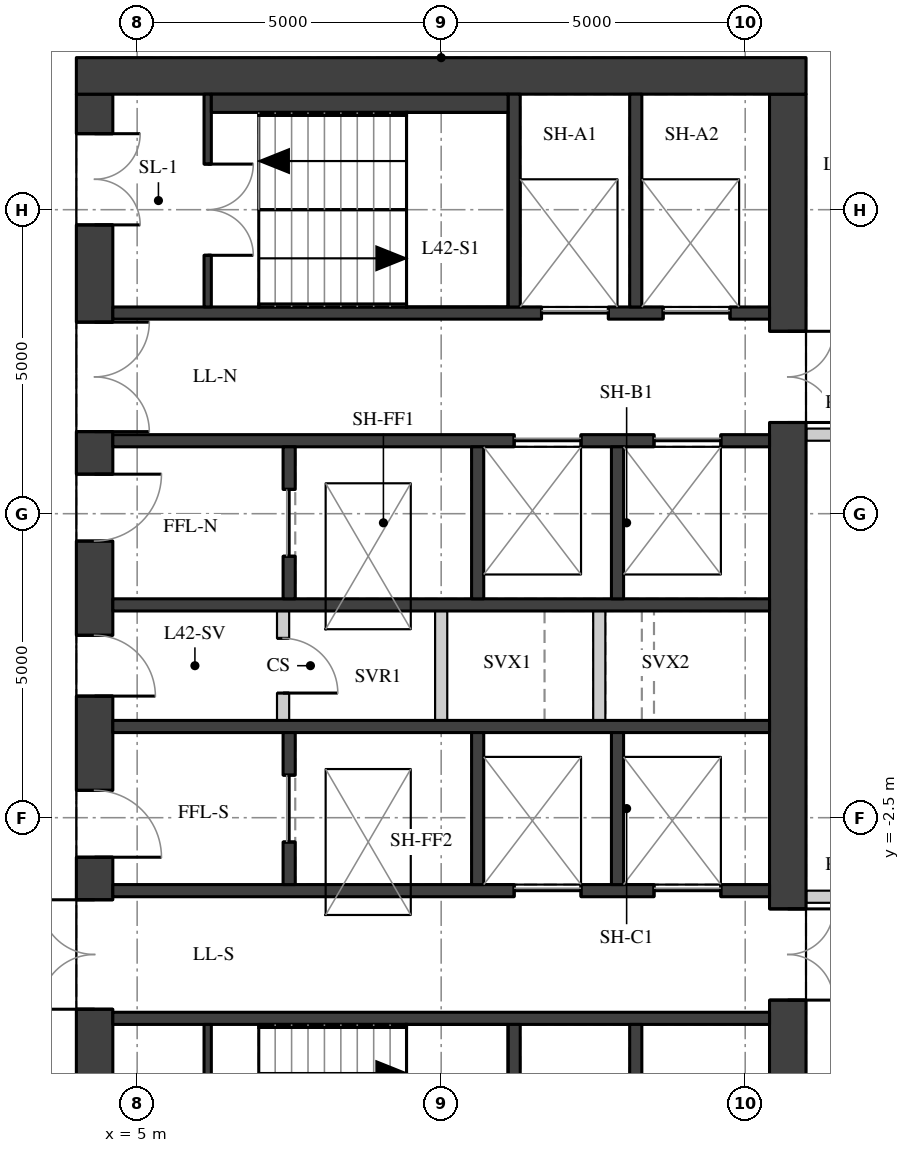
"""IFC4 building model, lengths in metres.
Left out: names, types, materials, properties, quantities, classifications, styles, units other than length and angle.
Written with IfcOpenShell. Run it as: python <this file> out.ifc"""

import sys

from ifc_helpers import new_model, si_unit, direction, frame, frame_2d, origin, place, context, subcontext, project, spatial, rectangle, extrude, element, fill, save


model = new_model("IFC4")
c1 = context("Model", 3, precision=1e-05, world=origin(), true_north=direction((0.0, 1.0)))
c2 = subcontext(c1, "Body", "Model", "MODEL_VIEW")
j1 = project(units=[si_unit("LENGTHUNIT", "METRE"), si_unit("PLANEANGLEUNIT", "RADIAN")], contexts=[c1])
p1 = place(None, origin())
s1 = spatial("IfcSite", under=j1, at=p1, CompositionType="ELEMENT")
p2 = place(p1, origin())
s2 = spatial("IfcBuilding", under=s1, at=p2, CompositionType="ELEMENT")
p3 = place(p2, frame((0.0, 0.0, 151.7)))
s3 = spatial("IfcBuildingStorey", under=s2, at=p3, CompositionType="ELEMENT", Elevation=151.7)
p4 = place(p3, frame((4.3, -9.4, 0.0), z_axis=(0.0, 0.0, 1.0), x_axis=(0.0, 1.0, 0.0)))
e1 = element("IfcWall", 1, at=p4, inside=s3, PredefinedType="SHEAR", context=c2, shape_type="SweptSolid", body=[
    extrude(rectangle(XDim=18.8, YDim=0.6, at=frame_2d((9.4, 0.0))), origin(), (0.0, 0.0, 1.0), 3.02),
])
p5 = place(p4, frame((0.65, 0.0, 0.0)))
e2 = element("IfcOpeningElement", 2, at=p5, cuts=e1, PredefinedType="OPENING", context=c2, shape_type="SweptSolid", body=[
    extrude(rectangle(XDim=1.5, YDim=2.1, at=frame_2d((0.75, 1.05))), frame((0.0, 0.31, 0.0), z_axis=(0.0, -1.0, 0.0), x_axis=(1.0, 0.0, 0.0)), (0.0, 0.0, 1.0), 0.62),
])
p6 = place(p4, frame((3.75, 0.0, 0.0)))
e3 = element("IfcOpeningElement", 3, at=p6, cuts=e1, PredefinedType="OPENING", context=c2, shape_type="SweptSolid", body=[
    extrude(rectangle(XDim=1.8, YDim=2.1, at=frame_2d((0.9, 1.05))), frame((0.0, 0.31, 0.0), z_axis=(0.0, -1.0, 0.0), x_axis=(1.0, 0.0, 0.0)), (0.0, 0.0, 1.0), 0.62),
])
p7 = place(p4, frame((6.25, 0.0, 0.0)))
e4 = element("IfcOpeningElement", 4, at=p7, cuts=e1, PredefinedType="OPENING", context=c2, shape_type="SweptSolid", body=[
    extrude(rectangle(XDim=1.1, YDim=2.1, at=frame_2d((0.55, 1.05))), frame((0.0, 0.31, 0.0), z_axis=(0.0, -1.0, 0.0), x_axis=(1.0, 0.0, 0.0)), (0.0, 0.0, 1.0), 0.62),
])
p8 = place(p4, frame((8.9, 0.0, 0.0)))
e5 = element("IfcOpeningElement", 5, at=p8, cuts=e1, PredefinedType="OPENING", context=c2, shape_type="SweptSolid", body=[
    extrude(rectangle(XDim=1.0, YDim=2.1, at=frame_2d((0.5, 1.05))), frame((0.0, 0.31, 0.0), z_axis=(0.0, -1.0, 0.0), x_axis=(1.0, 0.0, 0.0)), (0.0, 0.0, 1.0), 0.62),
])
p9 = place(p4, frame((11.45, 0.0, 0.0)))
e6 = element("IfcOpeningElement", 6, at=p9, cuts=e1, PredefinedType="OPENING", context=c2, shape_type="SweptSolid", body=[
    extrude(rectangle(XDim=1.1, YDim=2.1, at=frame_2d((0.55, 1.05))), frame((0.0, 0.31, 0.0), z_axis=(0.0, -1.0, 0.0), x_axis=(1.0, 0.0, 0.0)), (0.0, 0.0, 1.0), 0.62),
])
p10 = place(p4, frame((13.25, 0.0, 0.0)))
e7 = element("IfcOpeningElement", 7, at=p10, cuts=e1, PredefinedType="OPENING", context=c2, shape_type="SweptSolid", body=[
    extrude(rectangle(XDim=1.8, YDim=2.1, at=frame_2d((0.9, 1.05))), frame((0.0, 0.31, 0.0), z_axis=(0.0, -1.0, 0.0), x_axis=(1.0, 0.0, 0.0)), (0.0, 0.0, 1.0), 0.62),
])
p11 = place(p4, frame((16.65, 0.0, 0.0)))
e8 = element("IfcOpeningElement", 8, at=p11, cuts=e1, PredefinedType="OPENING", context=c2, shape_type="SweptSolid", body=[
    extrude(rectangle(XDim=1.5, YDim=2.1, at=frame_2d((0.75, 1.05))), frame((0.0, 0.31, 0.0), z_axis=(0.0, -1.0, 0.0), x_axis=(1.0, 0.0, 0.0)), (0.0, 0.0, 1.0), 0.62),
])
p12 = place(p3, frame((15.7, -9.4, 0.0), z_axis=(0.0, 0.0, 1.0), x_axis=(0.0, 1.0, 0.0)))
e9 = element("IfcWall", 9, at=p12, inside=s3, PredefinedType="SHEAR", context=c2, shape_type="SweptSolid", body=[
    extrude(rectangle(XDim=18.8, YDim=0.6, at=frame_2d((9.4, 0.0))), origin(), (0.0, 0.0, 1.0), 3.02),
])
p13 = place(p12, frame((13.4, 0.0, 0.0)))
e10 = element("IfcOpeningElement", 10, at=p13, cuts=e9, PredefinedType="OPENING", context=c2, shape_type="SweptSolid", body=[
    extrude(rectangle(XDim=1.5, YDim=2.1, at=frame_2d((0.75, 1.05))), frame((0.0, 0.31, 0.0), z_axis=(0.0, -1.0, 0.0), x_axis=(1.0, 0.0, 0.0)), (0.0, 0.0, 1.0), 0.62),
])
p14 = place(p12, frame((3.9, 0.0, 0.0)))
e11 = element("IfcOpeningElement", 11, at=p14, cuts=e9, PredefinedType="OPENING", context=c2, shape_type="SweptSolid", body=[
    extrude(rectangle(XDim=1.5, YDim=2.1, at=frame_2d((0.75, 1.05))), frame((0.0, 0.31, 0.0), z_axis=(0.0, -1.0, 0.0), x_axis=(1.0, 0.0, 0.0)), (0.0, 0.0, 1.0), 0.62),
])
p15 = place(p3, frame((4.0, 9.7, 0.0), z_axis=(0.0, 0.0, 1.0), x_axis=(1.0, 0.0, 0.0)))
e12 = element("IfcWall", 12, at=p15, inside=s3, PredefinedType="SHEAR", context=c2, shape_type="SweptSolid", body=[
    extrude(rectangle(XDim=12.0, YDim=0.6, at=frame_2d((6.0, 0.0))), origin(), (0.0, 0.0, 1.0), 3.02),
])
p16 = place(p3, frame((4.6, 5.8, 0.0), z_axis=(0.0, 0.0, 1.0), x_axis=(1.0, 0.0, 0.0)))
e13 = element("IfcWall", 13, at=p16, inside=s3, PredefinedType="SHEAR", context=c2, shape_type="SweptSolid", body=[
    extrude(rectangle(XDim=10.8, YDim=0.2, at=frame_2d((5.4, 0.0))), origin(), (0.0, 0.0, 1.0), 3.02),
])
p17 = place(p16, frame((7.05, 0.0, 0.0)))
e14 = element("IfcOpeningElement", 14, at=p17, cuts=e13, PredefinedType="OPENING", context=c2, shape_type="SweptSolid", body=[
    extrude(rectangle(XDim=1.1, YDim=2.1, at=frame_2d((0.55, 1.05))), frame((0.0, 0.11, 0.0), z_axis=(0.0, -1.0, 0.0), x_axis=(1.0, 0.0, 0.0)), (0.0, 0.0, 1.0), 0.22),
])
p18 = place(p16, frame((9.05, 0.0, 0.0)))
e15 = element("IfcOpeningElement", 15, at=p18, cuts=e13, PredefinedType="OPENING", context=c2, shape_type="SweptSolid", body=[
    extrude(rectangle(XDim=1.1, YDim=2.1, at=frame_2d((0.55, 1.05))), frame((0.0, 0.11, 0.0), z_axis=(0.0, -1.0, 0.0), x_axis=(1.0, 0.0, 0.0)), (0.0, 0.0, 1.0), 0.22),
])
p19 = place(p3, frame((4.6, 3.7, 0.0), z_axis=(0.0, 0.0, 1.0), x_axis=(1.0, 0.0, 0.0)))
e16 = element("IfcWall", 16, at=p19, inside=s3, PredefinedType="SHEAR", context=c2, shape_type="SweptSolid", body=[
    extrude(rectangle(XDim=10.8, YDim=0.2, at=frame_2d((5.4, 0.0))), origin(), (0.0, 0.0, 1.0), 3.02),
])
p20 = place(p19, frame((6.6, 0.0, 0.0)))
e17 = element("IfcOpeningElement", 17, at=p20, cuts=e16, PredefinedType="OPENING", context=c2, shape_type="SweptSolid", body=[
    extrude(rectangle(XDim=1.1, YDim=2.1, at=frame_2d((0.55, 1.05))), frame((0.0, 0.11, 0.0), z_axis=(0.0, -1.0, 0.0), x_axis=(1.0, 0.0, 0.0)), (0.0, 0.0, 1.0), 0.22),
])
p21 = place(p19, frame((8.9, 0.0, 0.0)))
e18 = element("IfcOpeningElement", 18, at=p21, cuts=e16, PredefinedType="OPENING", context=c2, shape_type="SweptSolid", body=[
    extrude(rectangle(XDim=1.1, YDim=2.1, at=frame_2d((0.55, 1.05))), frame((0.0, 0.11, 0.0), z_axis=(0.0, -1.0, 0.0), x_axis=(1.0, 0.0, 0.0)), (0.0, 0.0, 1.0), 0.22),
])
for number, where, z_axis, x_axis in (
    (19, (4.6, 1.0, 0.0), (0.0, 0.0, 1.0), (1.0, 0.0, 0.0)),
    (20, (4.6, -1.0, 0.0), (0.0, 0.0, 1.0), (1.0, 0.0, 0.0)),
):
    element("IfcWall", number, at=place(p3, frame(where, z_axis=z_axis, x_axis=x_axis)), inside=s3, PredefinedType="SHEAR", context=c2, shape_type="SweptSolid", body=[
        extrude(rectangle(XDim=10.8, YDim=0.2, at=frame_2d((5.4, 0.0))), origin(), (0.0, 0.0, 1.0), 3.02),
    ])
p22 = place(p3, frame((4.6, -3.7, 0.0), z_axis=(0.0, 0.0, 1.0), x_axis=(1.0, 0.0, 0.0)))
e21 = element("IfcWall", 21, at=p22, inside=s3, PredefinedType="SHEAR", context=c2, shape_type="SweptSolid", body=[
    extrude(rectangle(XDim=10.8, YDim=0.2, at=frame_2d((5.4, 0.0))), origin(), (0.0, 0.0, 1.0), 3.02),
])
p23 = place(p22, frame((6.6, 0.0, 0.0)))
e22 = element("IfcOpeningElement", 22, at=p23, cuts=e21, PredefinedType="OPENING", context=c2, shape_type="SweptSolid", body=[
    extrude(rectangle(XDim=1.1, YDim=2.1, at=frame_2d((0.55, 1.05))), frame((0.0, 0.11, 0.0), z_axis=(0.0, -1.0, 0.0), x_axis=(1.0, 0.0, 0.0)), (0.0, 0.0, 1.0), 0.22),
])
p24 = place(p22, frame((8.9, 0.0, 0.0)))
e23 = element("IfcOpeningElement", 23, at=p24, cuts=e21, PredefinedType="OPENING", context=c2, shape_type="SweptSolid", body=[
    extrude(rectangle(XDim=1.1, YDim=2.1, at=frame_2d((0.55, 1.05))), frame((0.0, 0.11, 0.0), z_axis=(0.0, -1.0, 0.0), x_axis=(1.0, 0.0, 0.0)), (0.0, 0.0, 1.0), 0.22),
])
p25 = place(p3, frame((4.6, -5.8, 0.0), z_axis=(0.0, 0.0, 1.0), x_axis=(1.0, 0.0, 0.0)))
e24 = element("IfcWall", 24, at=p25, inside=s3, PredefinedType="SHEAR", context=c2, shape_type="SweptSolid", body=[
    extrude(rectangle(XDim=10.8, YDim=0.2, at=frame_2d((5.4, 0.0))), origin(), (0.0, 0.0, 1.0), 3.02),
])
for number, where, z_axis, x_axis in (
    (25, (11.2, 5.9, 0.0), (0.0, 0.0, 1.0), (0.0, 1.0, 0.0)),
    (26, (11.2, -9.4, 0.0), (0.0, 0.0, 1.0), (0.0, 1.0, 0.0)),
    (27, (13.2, 5.9, 0.0), (0.0, 0.0, 1.0), (0.0, 1.0, 0.0)),
    (28, (13.2, -9.4, 0.0), (0.0, 0.0, 1.0), (0.0, 1.0, 0.0)),
):
    element("IfcWall", number, at=place(p3, frame(where, z_axis=z_axis, x_axis=x_axis)), inside=s3, PredefinedType="SHEAR", context=c2, shape_type="SweptSolid", body=[
        extrude(rectangle(XDim=3.5, YDim=0.2, at=frame_2d((1.75, 0.0))), origin(), (0.0, 0.0, 1.0), 3.02),
    ])
p26 = place(p3, frame((7.5, 1.1, 0.0), z_axis=(0.0, 0.0, 1.0), x_axis=(0.0, 1.0, 0.0)))
e29 = element("IfcWall", 29, at=p26, inside=s3, PredefinedType="SHEAR", context=c2, shape_type="SweptSolid", body=[
    extrude(rectangle(XDim=2.5, YDim=0.2, at=frame_2d((1.25, 0.0))), origin(), (0.0, 0.0, 1.0), 3.02),
])
p27 = place(p26, frame((0.7, 0.0, 0.0)))
e30 = element("IfcOpeningElement", 30, at=p27, cuts=e29, PredefinedType="OPENING", context=c2, shape_type="SweptSolid", body=[
    extrude(rectangle(XDim=1.1, YDim=2.1, at=frame_2d((0.55, 1.05))), frame((0.0, 0.11, 0.0), z_axis=(0.0, -1.0, 0.0), x_axis=(1.0, 0.0, 0.0)), (0.0, 0.0, 1.0), 0.22),
])
p28 = place(p3, frame((7.5, -3.6, 0.0), z_axis=(0.0, 0.0, 1.0), x_axis=(0.0, 1.0, 0.0)))
e31 = element("IfcWall", 31, at=p28, inside=s3, PredefinedType="SHEAR", context=c2, shape_type="SweptSolid", body=[
    extrude(rectangle(XDim=2.5, YDim=0.2, at=frame_2d((1.25, 0.0))), origin(), (0.0, 0.0, 1.0), 3.02),
])
p29 = place(p28, frame((0.7, 0.0, 0.0)))
e32 = element("IfcOpeningElement", 32, at=p29, cuts=e31, PredefinedType="OPENING", context=c2, shape_type="SweptSolid", body=[
    extrude(rectangle(XDim=1.1, YDim=2.1, at=frame_2d((0.55, 1.05))), frame((0.0, 0.11, 0.0), z_axis=(0.0, -1.0, 0.0), x_axis=(1.0, 0.0, 0.0)), (0.0, 0.0, 1.0), 0.22),
])
for number, where, z_axis, x_axis in (
    (33, (10.6, 1.1, 0.0), (0.0, 0.0, 1.0), (0.0, 1.0, 0.0)),
    (34, (10.6, -3.6, 0.0), (0.0, 0.0, 1.0), (0.0, 1.0, 0.0)),
    (35, (12.9, 1.1, 0.0), (0.0, 0.0, 1.0), (0.0, 1.0, 0.0)),
    (36, (12.9, -3.6, 0.0), (0.0, 0.0, 1.0), (0.0, 1.0, 0.0)),
):
    element("IfcWall", number, at=place(p3, frame(where, z_axis=z_axis, x_axis=x_axis)), inside=s3, PredefinedType="SHEAR", context=c2, shape_type="SweptSolid", body=[
        extrude(rectangle(XDim=2.5, YDim=0.2, at=frame_2d((1.25, 0.0))), origin(), (0.0, 0.0, 1.0), 3.02),
    ])
p30 = place(p3, frame((6.16, 5.9, 0.0), z_axis=(0.0, 0.0, 1.0), x_axis=(0.0, 1.0, 0.0)))
e37 = element("IfcWall", 37, at=p30, inside=s3, PredefinedType="SHEAR", context=c2, shape_type="SweptSolid", body=[
    extrude(rectangle(XDim=3.5, YDim=0.12, at=frame_2d((1.75, 0.0))), origin(), (0.0, 0.0, 1.0), 3.02),
])
p31 = place(p30, frame((0.85, 0.0, 0.0)))
e38 = element("IfcOpeningElement", 38, at=p31, cuts=e37, PredefinedType="OPENING", context=c2, shape_type="SweptSolid", body=[
    extrude(rectangle(XDim=1.5, YDim=2.1, at=frame_2d((0.75, 1.05))), frame((0.0, 0.07, 0.0), z_axis=(0.0, -1.0, 0.0), x_axis=(1.0, 0.0, 0.0)), (0.0, 0.0, 1.0), 0.14),
])
p32 = place(p3, frame((6.16, -9.4, 0.0), z_axis=(0.0, 0.0, 1.0), x_axis=(0.0, 1.0, 0.0)))
e39 = element("IfcWall", 39, at=p32, inside=s3, PredefinedType="SHEAR", context=c2, shape_type="SweptSolid", body=[
    extrude(rectangle(XDim=3.5, YDim=0.12, at=frame_2d((1.75, 0.0))), origin(), (0.0, 0.0, 1.0), 3.02),
])
p33 = place(p32, frame((1.15, 0.0, 0.0)))
e40 = element("IfcOpeningElement", 40, at=p33, cuts=e39, PredefinedType="OPENING", context=c2, shape_type="SweptSolid", body=[
    extrude(rectangle(XDim=1.5, YDim=2.1, at=frame_2d((0.75, 1.05))), frame((0.0, 0.07, 0.0), z_axis=(0.0, -1.0, 0.0), x_axis=(1.0, 0.0, 0.0)), (0.0, 0.0, 1.0), 0.14),
])
p34 = place(p3, frame((7.4, -0.9, 0.0), z_axis=(0.0, 0.0, 1.0), x_axis=(0.0, 1.0, 0.0)))
e41 = element("IfcWall", 41, at=p34, inside=s3, PredefinedType="PARTITIONING", context=c2, shape_type="SweptSolid", body=[
    extrude(rectangle(XDim=1.8, YDim=0.2, at=frame_2d((0.9, 0.0))), origin(), (0.0, 0.0, 1.0), 3.02),
])
p35 = place(p34, frame((0.45, 0.0, 0.0)))
e42 = element("IfcOpeningElement", 42, at=p35, cuts=e41, PredefinedType="OPENING", context=c2, shape_type="SweptSolid", body=[
    extrude(rectangle(XDim=0.9, YDim=2.1, at=frame_2d((0.45, 1.05))), frame((0.0, 0.11, 0.0), z_axis=(0.0, -1.0, 0.0), x_axis=(1.0, 0.0, 0.0)), (0.0, 0.0, 1.0), 0.22),
])
for number, where, z_axis, x_axis in (
    (43, (10.0, -0.9, 0.0), (0.0, 0.0, 1.0), (0.0, 1.0, 0.0)),
    (44, (12.6, -0.9, 0.0), (0.0, 0.0, 1.0), (0.0, 1.0, 0.0)),
):
    element("IfcWall", number, at=place(p3, frame(where, z_axis=z_axis, x_axis=x_axis)), inside=s3, PredefinedType="PARTITIONING", context=c2, shape_type="SweptSolid", body=[
        extrude(rectangle(XDim=1.8, YDim=0.2, at=frame_2d((0.9, 0.0))), origin(), (0.0, 0.0, 1.0), 3.02),
    ])
p36 = place(p3, frame((6.22, 9.25, 0.0), z_axis=(0.0, 0.0, 1.0), x_axis=(1.0, 0.0, 0.0)))
e45 = element("IfcWall", 45, at=p36, inside=s3, PredefinedType="PARTITIONING", context=c2, shape_type="SweptSolid", body=[
    extrude(rectangle(XDim=4.88, YDim=0.3, at=frame_2d((2.44, 0.0))), origin(), (0.0, 0.0, 1.0), 3.02),
])
for number, where, z_axis, x_axis in (
    (46, (17.5, 3.8, 0.0), (0.0, 0.0, 1.0), (-1.0, 0.0, 0.0)),
    (47, (16.004, -3.8, 0.0), (0.0, 0.0, 1.0), (1.0, 0.0, 0.0)),
):
    element("IfcWall", number, at=place(p3, frame(where, z_axis=z_axis, x_axis=x_axis)), inside=s3, PredefinedType="PARTITIONING", context=c2, shape_type="SweptSolid", body=[
        extrude(rectangle(XDim=1.496, YDim=0.2, at=frame_2d((0.748, 0.0))), origin(), (0.0, 0.0, 1.0), 2.57),
    ])
p37 = place(p6, origin())
e48 = element("IfcDoor", 48, at=p37, inside=s3, OperationType="DOUBLE_DOOR_SINGLE_SWING", PredefinedType="DOOR", context=c2, shape_type="SweptSolid", body=[
    extrude(rectangle(XDim=1.8, YDim=2.1, at=frame_2d((0.9, 1.05))), frame((0.0, 0.025, 0.0), z_axis=(0.0, -1.0, 0.0), x_axis=(1.0, 0.0, 0.0)), (0.0, 0.0, 1.0), 0.05),
])
fill(e3, e48)
p38 = place(p7, origin())
e49 = element("IfcDoor", 49, at=p38, inside=s3, OperationType="SINGLE_SWING_RIGHT", PredefinedType="DOOR", context=c2, shape_type="SweptSolid", body=[
    extrude(rectangle(XDim=1.1, YDim=2.1, at=frame_2d((0.55, 1.05))), frame((0.0, 0.025, 0.0), z_axis=(0.0, -1.0, 0.0), x_axis=(1.0, 0.0, 0.0)), (0.0, 0.0, 1.0), 0.05),
])
fill(e4, e49)
p39 = place(p8, origin())
e50 = element("IfcDoor", 50, at=p39, inside=s3, OperationType="SINGLE_SWING_RIGHT", PredefinedType="DOOR", context=c2, shape_type="SweptSolid", body=[
    extrude(rectangle(XDim=1.0, YDim=2.1, at=frame_2d((0.5, 1.05))), frame((0.0, 0.025, 0.0), z_axis=(0.0, -1.0, 0.0), x_axis=(1.0, 0.0, 0.0)), (0.0, 0.0, 1.0), 0.05),
])
fill(e5, e50)
p40 = place(p9, origin())
e51 = element("IfcDoor", 51, at=p40, inside=s3, OperationType="SINGLE_SWING_LEFT", PredefinedType="DOOR", context=c2, shape_type="SweptSolid", body=[
    extrude(rectangle(XDim=1.1, YDim=2.1, at=frame_2d((0.55, 1.05))), frame((0.0, 0.025, 0.0), z_axis=(0.0, -1.0, 0.0), x_axis=(1.0, 0.0, 0.0)), (0.0, 0.0, 1.0), 0.05),
])
fill(e6, e51)
p41 = place(p10, origin())
e52 = element("IfcDoor", 52, at=p41, inside=s3, OperationType="DOUBLE_DOOR_SINGLE_SWING", PredefinedType="DOOR", context=c2, shape_type="SweptSolid", body=[
    extrude(rectangle(XDim=1.8, YDim=2.1, at=frame_2d((0.9, 1.05))), frame((0.0, 0.025, 0.0), z_axis=(0.0, -1.0, 0.0), x_axis=(1.0, 0.0, 0.0)), (0.0, 0.0, 1.0), 0.05),
])
fill(e7, e52)
p42 = place(p11, origin())
e53 = element("IfcDoor", 53, at=p42, inside=s3, OperationType="DOUBLE_DOOR_SINGLE_SWING", PredefinedType="DOOR", context=c2, shape_type="SweptSolid", body=[
    extrude(rectangle(XDim=1.5, YDim=2.1, at=frame_2d((0.75, 1.05))), frame((0.0, 0.025, 0.0), z_axis=(0.0, -1.0, 0.0), x_axis=(1.0, 0.0, 0.0)), (0.0, 0.0, 1.0), 0.05),
])
fill(e8, e53)
p43 = place(p13, origin())
e54 = element("IfcDoor", 54, at=p43, inside=s3, OperationType="DOUBLE_DOOR_SINGLE_SWING", PredefinedType="DOOR", context=c2, shape_type="SweptSolid", body=[
    extrude(rectangle(XDim=1.5, YDim=2.1, at=frame_2d((0.75, 1.05))), frame((0.0, 0.025, 0.0), z_axis=(0.0, -1.0, 0.0), x_axis=(1.0, 0.0, 0.0)), (0.0, 0.0, 1.0), 0.05),
])
fill(e10, e54)
p44 = place(p14, origin())
e55 = element("IfcDoor", 55, at=p44, inside=s3, OperationType="DOUBLE_DOOR_SINGLE_SWING", PredefinedType="DOOR", context=c2, shape_type="SweptSolid", body=[
    extrude(rectangle(XDim=1.5, YDim=2.1, at=frame_2d((0.75, 1.05))), frame((0.0, 0.025, 0.0), z_axis=(0.0, -1.0, 0.0), x_axis=(1.0, 0.0, 0.0)), (0.0, 0.0, 1.0), 0.05),
])
fill(e11, e55)
p45 = place(p31, origin())
e56 = element("IfcDoor", 56, at=p45, inside=s3, OperationType="DOUBLE_DOOR_SINGLE_SWING", PredefinedType="DOOR", context=c2, shape_type="SweptSolid", body=[
    extrude(rectangle(XDim=1.5, YDim=2.1, at=frame_2d((0.75, 1.05))), frame((0.0, 0.025, 0.0), z_axis=(0.0, -1.0, 0.0), x_axis=(1.0, 0.0, 0.0)), (0.0, 0.0, 1.0), 0.05),
])
fill(e38, e56)
p46 = place(p17, origin())
e57 = element("IfcDoor", 57, at=p46, inside=s3, OperationType="DOUBLE_DOOR_SLIDING", PredefinedType="DOOR", context=c2, shape_type="SweptSolid", body=[
    extrude(rectangle(XDim=1.1, YDim=2.1, at=frame_2d((0.55, 1.05))), frame((0.0, 0.025, 0.0), z_axis=(0.0, -1.0, 0.0), x_axis=(1.0, 0.0, 0.0)), (0.0, 0.0, 1.0), 0.05),
])
fill(e14, e57)
p47 = place(p18, origin())
e58 = element("IfcDoor", 58, at=p47, inside=s3, OperationType="DOUBLE_DOOR_SLIDING", PredefinedType="DOOR", context=c2, shape_type="SweptSolid", body=[
    extrude(rectangle(XDim=1.1, YDim=2.1, at=frame_2d((0.55, 1.05))), frame((0.0, 0.025, 0.0), z_axis=(0.0, -1.0, 0.0), x_axis=(1.0, 0.0, 0.0)), (0.0, 0.0, 1.0), 0.05),
])
fill(e15, e58)
p48 = place(p20, origin())
e59 = element("IfcDoor", 59, at=p48, inside=s3, OperationType="DOUBLE_DOOR_SLIDING", PredefinedType="DOOR", context=c2, shape_type="SweptSolid", body=[
    extrude(rectangle(XDim=1.1, YDim=2.1, at=frame_2d((0.55, 1.05))), frame((0.0, 0.025, 0.0), z_axis=(0.0, -1.0, 0.0), x_axis=(1.0, 0.0, 0.0)), (0.0, 0.0, 1.0), 0.05),
])
fill(e17, e59)
p49 = place(p21, origin())
e60 = element("IfcDoor", 60, at=p49, inside=s3, OperationType="DOUBLE_DOOR_SLIDING", PredefinedType="DOOR", context=c2, shape_type="SweptSolid", body=[
    extrude(rectangle(XDim=1.1, YDim=2.1, at=frame_2d((0.55, 1.05))), frame((0.0, 0.025, 0.0), z_axis=(0.0, -1.0, 0.0), x_axis=(1.0, 0.0, 0.0)), (0.0, 0.0, 1.0), 0.05),
])
fill(e18, e60)
p50 = place(p23, origin())
e61 = element("IfcDoor", 61, at=p50, inside=s3, OperationType="DOUBLE_DOOR_SLIDING", PredefinedType="DOOR", context=c2, shape_type="SweptSolid", body=[
    extrude(rectangle(XDim=1.1, YDim=2.1, at=frame_2d((0.55, 1.05))), frame((0.0, 0.025, 0.0), z_axis=(0.0, -1.0, 0.0), x_axis=(1.0, 0.0, 0.0)), (0.0, 0.0, 1.0), 0.05),
])
fill(e22, e61)
p51 = place(p24, origin())
e62 = element("IfcDoor", 62, at=p51, inside=s3, OperationType="DOUBLE_DOOR_SLIDING", PredefinedType="DOOR", context=c2, shape_type="SweptSolid", body=[
    extrude(rectangle(XDim=1.1, YDim=2.1, at=frame_2d((0.55, 1.05))), frame((0.0, 0.025, 0.0), z_axis=(0.0, -1.0, 0.0), x_axis=(1.0, 0.0, 0.0)), (0.0, 0.0, 1.0), 0.05),
])
fill(e23, e62)
p52 = place(p27, origin())
e63 = element("IfcDoor", 63, at=p52, inside=s3, OperationType="DOUBLE_DOOR_SLIDING", PredefinedType="DOOR", context=c2, shape_type="SweptSolid", body=[
    extrude(rectangle(XDim=1.1, YDim=2.1, at=frame_2d((0.55, 1.05))), frame((0.0, 0.025, 0.0), z_axis=(0.0, -1.0, 0.0), x_axis=(1.0, 0.0, 0.0)), (0.0, 0.0, 1.0), 0.05),
])
fill(e30, e63)
p53 = place(p29, origin())
e64 = element("IfcDoor", 64, at=p53, inside=s3, OperationType="DOUBLE_DOOR_SLIDING", PredefinedType="DOOR", context=c2, shape_type="SweptSolid", body=[
    extrude(rectangle(XDim=1.1, YDim=2.1, at=frame_2d((0.55, 1.05))), frame((0.0, 0.025, 0.0), z_axis=(0.0, -1.0, 0.0), x_axis=(1.0, 0.0, 0.0)), (0.0, 0.0, 1.0), 0.05),
])
fill(e32, e64)
p54 = place(p35, origin())
e65 = element("IfcDoor", 65, at=p54, inside=s3, OperationType="SINGLE_SWING_RIGHT", PredefinedType="DOOR", context=c2, shape_type="SweptSolid", body=[
    extrude(rectangle(XDim=0.9, YDim=2.1, at=frame_2d((0.45, 1.05))), frame((0.0, 0.025, 0.0), z_axis=(0.0, -1.0, 0.0), x_axis=(1.0, 0.0, 0.0)), (0.0, 0.0, 1.0), 0.05),
])
fill(e42, e65)
save(model, sys.argv[1])
